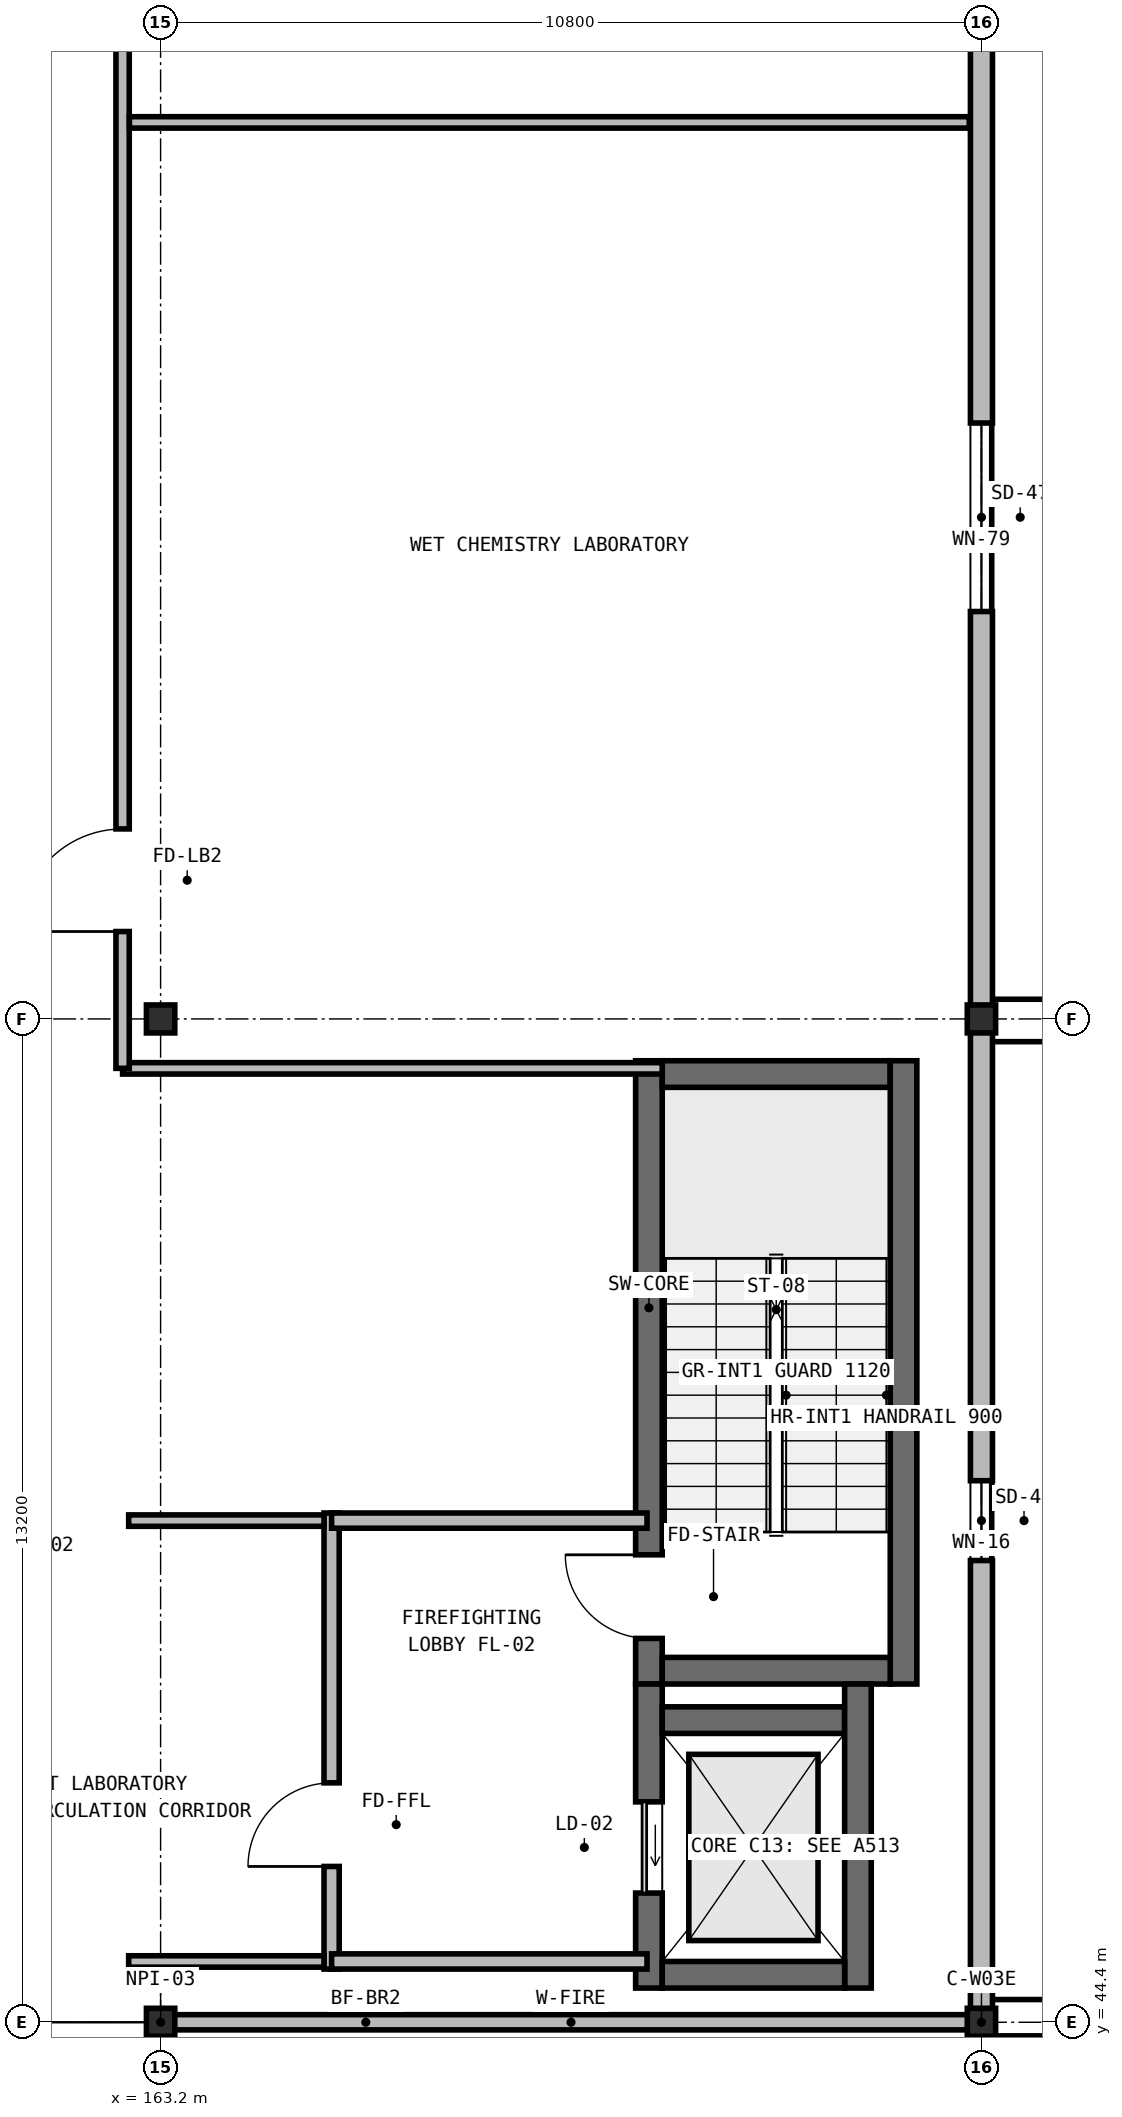
"""IFC4 building model, lengths in metres.
Left out: names, types, materials, properties, quantities, classifications, styles, units other than length and angle.
Written with IfcOpenShell. Run it as: python <this file> out.ifc"""

import sys

from ifc_helpers import new_model, si_unit, direction, frame, frame_2d, origin, origin_2d, place, context, subcontext, project, spatial, rectangle, i_section, extrude, element, fill, save


model = new_model("IFC4")
c1 = context("Model", 3, precision=1e-05, world=origin(), true_north=direction((0.0, 1.0)))
c2 = subcontext(c1, "Body", "Model", "MODEL_VIEW")
j1 = project(units=[si_unit("LENGTHUNIT", "METRE"), si_unit("PLANEANGLEUNIT", "RADIAN")], contexts=[c1])
p1 = place(None, origin())
s1 = spatial("IfcSite", under=j1, at=p1, CompositionType="ELEMENT")
p2 = place(p1, origin())
s2 = spatial("IfcBuilding", under=s1, at=p2, CompositionType="ELEMENT")
p3 = place(p2, frame((0.0, 0.0, 23.45)))
s3 = spatial("IfcBuildingStorey", under=s2, at=p3, CompositionType="ELEMENT", Elevation=23.45)
p4 = place(p3, frame((169.625, 48.85, 0.0), z_axis=(0.0, 0.0, 1.0), x_axis=(0.0, 1.0, 0.0)))
e1 = element("IfcWall", 1, at=p4, inside=s3, PredefinedType="SHEAR", context=c2, shape_type="SweptSolid", body=[
    extrude(rectangle(XDim=8.2, YDim=0.35, at=frame_2d((4.1, 0.0))), origin(), (0.0, 0.0, 1.0), 4.55),
])
p5 = place(p4, frame((0.6, 0.0, 0.0)))
e2 = element("IfcOpeningElement", 2, at=p5, cuts=e1, PredefinedType="OPENING", context=c2, shape_type="SweptSolid", body=[
    extrude(rectangle(XDim=1.1, YDim=2.15, at=frame_2d((0.55, 1.075))), frame((0.0, 0.185, 0.0), z_axis=(0.0, -1.0, 0.0), x_axis=(1.0, 0.0, 0.0)), (0.0, 0.0, 1.0), 0.37),
])
p6 = place(p3, frame((169.8, 56.875, 0.0), z_axis=(0.0, 0.0, 1.0), x_axis=(1.0, 0.0, 0.0)))
e3 = element("IfcWall", 3, at=p6, inside=s3, PredefinedType="SHEAR", context=c2, shape_type="SweptSolid", body=[
    extrude(rectangle(XDim=3.0, YDim=0.35, at=frame_2d((1.5, 0.0))), origin(), (0.0, 0.0, 1.0), 4.55),
])
p7 = place(p3, frame((172.975, 57.05, 0.0), z_axis=(0.0, 0.0, 1.0), x_axis=(0.0, -1.0, 0.0)))
e4 = element("IfcWall", 4, at=p7, inside=s3, PredefinedType="SHEAR", context=c2, shape_type="SweptSolid", body=[
    extrude(rectangle(XDim=8.2, YDim=0.35, at=frame_2d((4.1, 0.0))), origin(), (0.0, 0.0, 1.0), 4.55),
])
p8 = place(p3, frame((172.8, 49.025, 0.0), z_axis=(0.0, 0.0, 1.0), x_axis=(-1.0, 0.0, 0.0)))
e5 = element("IfcWall", 5, at=p8, inside=s3, PredefinedType="SHEAR", context=c2, shape_type="SweptSolid", body=[
    extrude(rectangle(XDim=3.0, YDim=0.35, at=frame_2d((1.5, 0.0))), origin(), (0.0, 0.0, 1.0), 4.55),
])
p9 = place(p3, frame((169.625, 44.85, 0.0), z_axis=(0.0, 0.0, 1.0), x_axis=(0.0, 1.0, 0.0)))
e6 = element("IfcWall", 6, at=p9, inside=s3, PredefinedType="SHEAR", context=c2, shape_type="SweptSolid", body=[
    extrude(rectangle(XDim=4.0, YDim=0.35, at=frame_2d((2.0, 0.0))), origin(), (0.0, 0.0, 1.0), 4.55),
])
p10 = place(p9, frame((1.25, 0.0, 0.0)))
e7 = element("IfcOpeningElement", 7, at=p10, cuts=e6, PredefinedType="OPENING", context=c2, shape_type="SweptSolid", body=[
    extrude(rectangle(XDim=1.2, YDim=2.15, at=frame_2d((0.6, 1.075))), frame((0.0, 0.185, 0.0), z_axis=(0.0, -1.0, 0.0), x_axis=(1.0, 0.0, 0.0)), (0.0, 0.0, 1.0), 0.37),
])
p11 = place(p3, frame((169.8, 48.375, 0.0), z_axis=(0.0, 0.0, 1.0), x_axis=(1.0, 0.0, 0.0)))
e8 = element("IfcWall", 8, at=p11, inside=s3, PredefinedType="SHEAR", context=c2, shape_type="SweptSolid", body=[
    extrude(rectangle(XDim=2.4, YDim=0.35, at=frame_2d((1.2, 0.0))), origin(), (0.0, 0.0, 1.0), 4.55),
])
p12 = place(p3, frame((172.375, 48.85, 0.0), z_axis=(0.0, 0.0, 1.0), x_axis=(0.0, -1.0, 0.0)))
e9 = element("IfcWall", 9, at=p12, inside=s3, PredefinedType="SHEAR", context=c2, shape_type="SweptSolid", body=[
    extrude(rectangle(XDim=4.0, YDim=0.35, at=frame_2d((2.0, 0.0))), origin(), (0.0, 0.0, 1.0), 4.55),
])
p13 = place(p3, frame((172.2, 45.025, 0.0), z_axis=(0.0, 0.0, 1.0), x_axis=(-1.0, 0.0, 0.0)))
e10 = element("IfcWall", 10, at=p13, inside=s3, PredefinedType="SHEAR", context=c2, shape_type="SweptSolid", body=[
    extrude(rectangle(XDim=2.4, YDim=0.35, at=frame_2d((1.2, 0.0))), origin(), (0.0, 0.0, 1.0), 4.55),
])
for number, where, z_axis, x_axis in (
    (11, (163.2, 44.4, 0.0), (0.0, 0.0, 1.0), (1.0, 0.0, 0.0)),
    (12, (163.2, 57.6, 0.0), (0.0, 0.0, 1.0), (1.0, 0.0, 0.0)),
    (13, (174.0, 44.4, 0.0), (0.0, 0.0, 1.0), (1.0, 0.0, 0.0)),
    (14, (174.0, 57.6, 0.0), (0.0, 0.0, 1.0), (1.0, 0.0, 0.0)),
):
    element("IfcColumn", number, at=place(p3, frame(where, z_axis=z_axis, x_axis=x_axis)), inside=s3, PredefinedType="COLUMN", context=c2, shape_type="SweptSolid", body=[
        extrude(i_section(OverallWidth=0.373, OverallDepth=0.368, WebThickness=0.017, FlangeThickness=0.027, at=origin_2d()), origin(), (0.0, 0.0, 1.0), 4.55),
    ])
p14 = place(p3, frame((174.0, 70.796, 0.0), z_axis=(0.0, 0.0, 1.0), x_axis=(0.0, -1.0, 0.0)))
e15 = element("IfcWall", 15, at=p14, inside=s3, PredefinedType="SOLIDWALL", context=c2, shape_type="SweptSolid", body=[
    extrude(rectangle(XDim=13.192, YDim=0.29, at=frame_2d((6.596, 0.0))), origin(), (0.0, 0.0, 1.0), 3.831),
])
p15 = place(p14, frame((5.356, 0.0, 0.95)))
e16 = element("IfcOpeningElement", 16, at=p15, cuts=e15, PredefinedType="OPENING", context=c2, shape_type="SweptSolid", body=[
    extrude(rectangle(XDim=2.48, YDim=1.4, at=frame_2d((1.24, 0.7))), frame((0.0, 0.155, 0.0), z_axis=(0.0, -1.0, 0.0), x_axis=(1.0, 0.0, 0.0)), (0.0, 0.0, 1.0), 0.31),
])
p16 = place(p3, frame((174.0, 57.596, 0.0), z_axis=(0.0, 0.0, 1.0), x_axis=(0.0, -1.0, 0.0)))
e17 = element("IfcWall", 17, at=p16, inside=s3, PredefinedType="SOLIDWALL", context=c2, shape_type="SweptSolid", body=[
    extrude(rectangle(XDim=13.192, YDim=0.29, at=frame_2d((6.596, 0.0))), origin(), (0.0, 0.0, 1.0), 3.831),
])
p17 = place(p16, frame((6.071, 0.0, 0.95)))
e18 = element("IfcOpeningElement", 18, at=p17, cuts=e17, PredefinedType="OPENING", context=c2, shape_type="SweptSolid", body=[
    extrude(rectangle(XDim=1.05, YDim=1.8, at=frame_2d((0.525, 0.9))), frame((0.0, 0.155, 0.0), z_axis=(0.0, -1.0, 0.0), x_axis=(1.0, 0.0, 0.0)), (0.0, 0.0, 1.0), 0.31),
])
p18 = place(p3, frame((174.0, 44.396, 0.0), z_axis=(0.0, 0.0, 1.0), x_axis=(0.0, -1.0, 0.0)))
e19 = element("IfcWall", 19, at=p18, inside=s3, PredefinedType="SOLIDWALL", context=c2, shape_type="SweptSolid", body=[
    extrude(rectangle(XDim=9.592, YDim=0.29, at=frame_2d((4.796, 0.0))), origin(), (0.0, 0.0, 1.0), 3.899),
])
p19 = place(p18, frame((4.106, 0.0, 0.95)))
e20 = element("IfcOpeningElement", 20, at=p19, cuts=e19, PredefinedType="OPENING", context=c2, shape_type="SweptSolid", body=[
    extrude(rectangle(XDim=1.38, YDim=1.72, at=frame_2d((0.69, 0.86))), frame((0.0, 0.155, 0.0), z_axis=(0.0, -1.0, 0.0), x_axis=(1.0, 0.0, 0.0)), (0.0, 0.0, 1.0), 0.31),
])
p20 = place(p3, frame((163.36, 44.4, 0.0), z_axis=(0.0, 0.0, 1.0), x_axis=(1.0, 0.0, 0.0)))
e21 = element("IfcWall", 21, at=p20, inside=s3, PredefinedType="SOLIDWALL", context=c2, shape_type="SweptSolid", body=[
    extrude(rectangle(XDim=10.48, YDim=0.2, at=frame_2d((5.24, 0.0))), origin(), (0.0, 0.0, 1.0), 3.754),
])
p21 = place(p3, frame((165.45, 45.1, 0.0), z_axis=(0.0, 0.0, 1.0), x_axis=(0.0, 1.0, 0.0)))
e22 = element("IfcWall", 22, at=p21, inside=s3, PredefinedType="SOLIDWALL", context=c2, shape_type="SweptSolid", body=[
    extrude(rectangle(XDim=6.0, YDim=0.2, at=frame_2d((3.0, 0.0))), origin(), (0.0, 0.0, 1.0), 4.3),
])
p22 = place(p21, frame((1.35, 0.0, 0.0)))
e23 = element("IfcOpeningElement", 23, at=p22, cuts=e22, PredefinedType="OPENING", context=c2, shape_type="SweptSolid", body=[
    extrude(rectangle(XDim=1.1, YDim=2.15, at=frame_2d((0.55, 1.075))), frame((0.0, 0.11, 0.0), z_axis=(0.0, -1.0, 0.0), x_axis=(1.0, 0.0, 0.0)), (0.0, 0.0, 1.0), 0.22),
])
for number, where, z_axis, x_axis in (
    (24, (165.45, 45.2, 0.0), (0.0, 0.0, 1.0), (1.0, 0.0, 0.0)),
    (25, (165.45, 51.0, 0.0), (0.0, 0.0, 1.0), (1.0, 0.0, 0.0)),
):
    element("IfcWall", number, at=place(p3, frame(where, z_axis=z_axis, x_axis=x_axis)), inside=s3, PredefinedType="SOLIDWALL", context=c2, shape_type="SweptSolid", body=[
        extrude(rectangle(XDim=4.15, YDim=0.2, at=frame_2d((2.075, 0.0))), origin(), (0.0, 0.0, 1.0), 4.3),
    ])
p23 = place(p3, frame((162.7, 56.95, 0.0), z_axis=(0.0, 0.0, 1.0), x_axis=(1.0, 0.0, 0.0)))
e26 = element("IfcWall", 26, at=p23, inside=s3, PredefinedType="PARTITIONING", context=c2, shape_type="SweptSolid", body=[
    extrude(rectangle(XDim=7.1, YDim=0.15, at=frame_2d((3.55, 0.0))), origin(), (0.0, 0.0, 1.0), 4.3),
])
p24 = place(p3, frame((162.7, 56.95, 0.0), z_axis=(0.0, 0.0, 1.0), x_axis=(0.0, 1.0, 0.0)))
e27 = element("IfcWall", 27, at=p24, inside=s3, PredefinedType="PARTITIONING", context=c2, shape_type="SweptSolid", body=[
    extrude(rectangle(XDim=17.8, YDim=0.175, at=frame_2d((8.9, 0.0))), origin(), (0.0, 0.0, 1.0), 4.3),
])
p25 = place(p24, frame((1.8, 0.0, 0.0)))
e28 = element("IfcOpeningElement", 28, at=p25, cuts=e27, PredefinedType="OPENING", context=c2, shape_type="SweptSolid", body=[
    extrude(rectangle(XDim=1.35, YDim=2.2, at=frame_2d((0.675, 1.1))), frame((0.0, 0.097, 0.0), z_axis=(0.0, -1.0, 0.0), x_axis=(1.0, 0.0, 0.0)), (0.0, 0.0, 1.0), 0.195),
])
p26 = place(p24, frame((15.245, 0.0, 0.0)))
e29 = element("IfcOpeningElement", 29, at=p26, cuts=e27, PredefinedType="OPENING", context=c2, shape_type="SweptSolid", body=[
    extrude(rectangle(XDim=1.35, YDim=2.2, at=frame_2d((0.675, 1.1))), frame((0.0, 0.097, 0.0), z_axis=(0.0, -1.0, 0.0), x_axis=(1.0, 0.0, 0.0)), (0.0, 0.0, 1.0), 0.195),
])
p27 = place(p3, frame((162.79, 69.395, 0.0), z_axis=(0.0, 0.0, 1.0), x_axis=(1.0, 0.0, 0.0)))
e30 = element("IfcWall", 30, at=p27, inside=s3, PredefinedType="PARTITIONING", context=c2, shape_type="SweptSolid", body=[
    extrude(rectangle(XDim=11.05, YDim=0.15, at=frame_2d((5.525, 0.0))), origin(), (0.0, 0.0, 1.0), 4.3),
])
for number, where, z_axis, x_axis in (
    (31, (162.78, 45.2, 0.0), (0.0, 0.0, 1.0), (1.0, 0.0, 0.0)),
    (32, (162.78, 51.0, 0.0), (0.0, 0.0, 1.0), (1.0, 0.0, 0.0)),
):
    element("IfcWall", number, at=place(p3, frame(where, z_axis=z_axis, x_axis=x_axis)), inside=s3, PredefinedType="PARTITIONING", context=c2, shape_type="SweptSolid", body=[
        extrude(rectangle(XDim=2.57, YDim=0.15, at=frame_2d((1.285, 0.0))), origin(), (0.0, 0.0, 1.0), 4.3),
    ])
p28 = place(p15, origin())
e33 = element("IfcWindow", 33, at=p28, inside=s3, PartitioningType="SINGLE_PANEL", PredefinedType="WINDOW", context=c2, shape_type="SweptSolid", body=[
    extrude(rectangle(XDim=2.48, YDim=1.4, at=frame_2d((1.24, 0.7))), frame((0.0, 0.03, 0.0), z_axis=(0.0, -1.0, 0.0), x_axis=(1.0, 0.0, 0.0)), (0.0, 0.0, 1.0), 0.06),
])
fill(e16, e33)
p29 = place(p17, origin())
e34 = element("IfcWindow", 34, at=p29, inside=s3, PartitioningType="SINGLE_PANEL", PredefinedType="WINDOW", context=c2, shape_type="SweptSolid", body=[
    extrude(rectangle(XDim=1.05, YDim=1.8, at=frame_2d((0.525, 0.9))), frame((0.0, 0.03, 0.0), z_axis=(0.0, -1.0, 0.0), x_axis=(1.0, 0.0, 0.0)), (0.0, 0.0, 1.0), 0.06),
])
fill(e18, e34)
p30 = place(p5, origin())
e35 = element("IfcDoor", 35, at=p30, inside=s3, OperationType="SINGLE_SWING_RIGHT", PredefinedType="DOOR", context=c2, shape_type="SweptSolid", body=[
    extrude(rectangle(XDim=1.1, YDim=2.15, at=frame_2d((0.55, 1.075))), frame((0.0, 0.025, 0.0), z_axis=(0.0, -1.0, 0.0), x_axis=(1.0, 0.0, 0.0)), (0.0, 0.0, 1.0), 0.05),
])
fill(e2, e35)
p31 = place(p10, origin())
e36 = element("IfcDoor", 36, at=p31, inside=s3, OperationType="SLIDING_TO_LEFT", PredefinedType="USERDEFINED", context=c2, shape_type="SweptSolid", body=[
    extrude(rectangle(XDim=1.2, YDim=2.15, at=frame_2d((0.6, 1.075))), frame((0.0, 0.025, 0.0), z_axis=(0.0, -1.0, 0.0), x_axis=(1.0, 0.0, 0.0)), (0.0, 0.0, 1.0), 0.05),
])
fill(e7, e36)
p32 = place(p22, origin())
e37 = element("IfcDoor", 37, at=p32, inside=s3, OperationType="SINGLE_SWING_LEFT", PredefinedType="DOOR", context=c2, shape_type="SweptSolid", body=[
    extrude(rectangle(XDim=1.1, YDim=2.15, at=frame_2d((0.55, 1.075))), frame((0.0, 0.025, 0.0), z_axis=(0.0, -1.0, 0.0), x_axis=(1.0, 0.0, 0.0)), (0.0, 0.0, 1.0), 0.05),
])
fill(e23, e37)
p33 = place(p25, origin())
e38 = element("IfcDoor", 38, at=p33, inside=s3, OperationType="SINGLE_SWING_LEFT", PredefinedType="DOOR", context=c2, shape_type="SweptSolid", body=[
    extrude(rectangle(XDim=1.35, YDim=2.2, at=frame_2d((0.675, 1.1))), frame((0.0, 0.025, 0.0), z_axis=(0.0, -1.0, 0.0), x_axis=(1.0, 0.0, 0.0)), (0.0, 0.0, 1.0), 0.05),
])
fill(e28, e38)
save(model, sys.argv[1])
